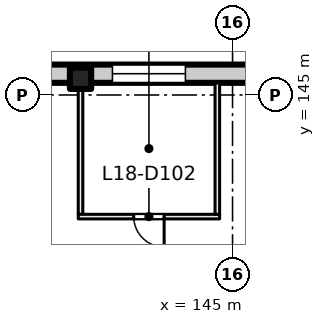
"""IFC4 building model, lengths in metres.
Left out: names, types, materials, properties, quantities, classifications, styles, units other than length and angle.
Written with IfcOpenShell. Run it as: python <this file> out.ifc"""

import sys

from ifc_helpers import new_model, si_unit, direction, frame, frame_2d, origin, origin_2d, place, context, subcontext, project, spatial, rectangle, extrude, element, fill, save


model = new_model("IFC4")
c1 = context("Model", 3, precision=1e-05, world=origin(), true_north=direction((0.0, 1.0)))
c2 = subcontext(c1, "Body", "Model", "MODEL_VIEW")
j1 = project(units=[si_unit("LENGTHUNIT", "METRE"), si_unit("PLANEANGLEUNIT", "RADIAN")], contexts=[c1])
p1 = place(None, origin())
s1 = spatial("IfcSite", under=j1, at=p1, CompositionType="ELEMENT")
p2 = place(p1, origin())
s2 = spatial("IfcBuilding", under=s1, at=p2, CompositionType="ELEMENT")
p3 = place(p2, frame((0.0, 0.0, 81.0)))
s3 = spatial("IfcBuildingStorey", under=s2, at=p3, CompositionType="ELEMENT", Elevation=81.0)
p4 = place(p3, frame((140.0, 145.55, 0.0), z_axis=(0.0, 0.0, 1.0), x_axis=(1.0, 0.0, 0.0)))
e1 = element("IfcColumn", 1, at=p4, inside=s3, PredefinedType="COLUMN", context=c2, shape_type="SweptSolid", body=[
    extrude(rectangle(XDim=0.7, YDim=0.7, at=origin_2d()), origin(), (0.0, 0.0, 1.0), 4.0),
])
p5 = place(p3, frame((131.07, 145.7, 0.0), z_axis=(0.0, 0.0, 1.0), x_axis=(1.0, 0.0, 0.0)))
e2 = element("IfcWall", 2, at=p5, inside=s3, PredefinedType="SOLIDWALL", context=c2, shape_type="SweptSolid", body=[
    extrude(rectangle(XDim=31.93, YDim=0.6, at=frame_2d((15.965, 0.0))), origin(), (0.0, 0.0, 1.0), 3.625),
])
p6 = place(p5, frame((0.98, 0.0, 0.9)))
e3 = element("IfcOpeningElement", 3, at=p6, cuts=e2, PredefinedType="OPENING", context=c2, shape_type="SweptSolid", body=[
    extrude(rectangle(XDim=2.4, YDim=2.4, at=frame_2d((1.2, 1.2))), frame((0.0, 0.31, 0.0), z_axis=(0.0, -1.0, 0.0), x_axis=(1.0, 0.0, 0.0)), (0.0, 0.0, 1.0), 0.62),
])
p7 = place(p5, frame((5.48, 0.0, 0.9)))
e4 = element("IfcOpeningElement", 4, at=p7, cuts=e2, PredefinedType="OPENING", context=c2, shape_type="SweptSolid", body=[
    extrude(rectangle(XDim=2.4, YDim=2.4, at=frame_2d((1.2, 1.2))), frame((0.0, 0.31, 0.0), z_axis=(0.0, -1.0, 0.0), x_axis=(1.0, 0.0, 0.0)), (0.0, 0.0, 1.0), 0.62),
])
p8 = place(p5, frame((9.98, 0.0, 0.9)))
e5 = element("IfcOpeningElement", 5, at=p8, cuts=e2, PredefinedType="OPENING", context=c2, shape_type="SweptSolid", body=[
    extrude(rectangle(XDim=2.4, YDim=2.4, at=frame_2d((1.2, 1.2))), frame((0.0, 0.31, 0.0), z_axis=(0.0, -1.0, 0.0), x_axis=(1.0, 0.0, 0.0)), (0.0, 0.0, 1.0), 0.62),
])
p9 = place(p5, frame((14.48, 0.0, 0.9)))
e6 = element("IfcOpeningElement", 6, at=p9, cuts=e2, PredefinedType="OPENING", context=c2, shape_type="SweptSolid", body=[
    extrude(rectangle(XDim=2.4, YDim=2.4, at=frame_2d((1.2, 1.2))), frame((0.0, 0.31, 0.0), z_axis=(0.0, -1.0, 0.0), x_axis=(1.0, 0.0, 0.0)), (0.0, 0.0, 1.0), 0.62),
])
p10 = place(p5, frame((18.98, 0.0, 0.9)))
e7 = element("IfcOpeningElement", 7, at=p10, cuts=e2, PredefinedType="OPENING", context=c2, shape_type="SweptSolid", body=[
    extrude(rectangle(XDim=2.4, YDim=2.4, at=frame_2d((1.2, 1.2))), frame((0.0, 0.31, 0.0), z_axis=(0.0, -1.0, 0.0), x_axis=(1.0, 0.0, 0.0)), (0.0, 0.0, 1.0), 0.62),
])
p11 = place(p5, frame((23.48, 0.0, 0.9)))
e8 = element("IfcOpeningElement", 8, at=p11, cuts=e2, PredefinedType="OPENING", context=c2, shape_type="SweptSolid", body=[
    extrude(rectangle(XDim=2.4, YDim=2.4, at=frame_2d((1.2, 1.2))), frame((0.0, 0.31, 0.0), z_axis=(0.0, -1.0, 0.0), x_axis=(1.0, 0.0, 0.0)), (0.0, 0.0, 1.0), 0.62),
])
p12 = place(p5, frame((27.98, 0.0, 0.9)))
e9 = element("IfcOpeningElement", 9, at=p12, cuts=e2, PredefinedType="OPENING", context=c2, shape_type="SweptSolid", body=[
    extrude(rectangle(XDim=2.4, YDim=2.4, at=frame_2d((1.2, 1.2))), frame((0.0, 0.31, 0.0), z_axis=(0.0, -1.0, 0.0), x_axis=(1.0, 0.0, 0.0)), (0.0, 0.0, 1.0), 0.62),
])
p13 = place(p3, frame((140.0, 141.075, 0.0), z_axis=(0.0, 0.0, 1.0), x_axis=(0.0, 1.0, 0.0)))
e10 = element("IfcWall", 10, at=p13, inside=s3, PredefinedType="PARTITIONING", context=c2, shape_type="SweptSolid", body=[
    extrude(rectangle(XDim=4.325, YDim=0.15, at=frame_2d((2.163, 0.0))), origin(), (0.0, 0.0, 1.0), 3.625),
])
p14 = place(p3, frame((144.575, 141.0, 0.0), z_axis=(0.0, 0.0, 1.0), x_axis=(-1.0, 0.0, 0.0)))
e11 = element("IfcWall", 11, at=p14, inside=s3, PredefinedType="PARTITIONING", context=c2, shape_type="SweptSolid", body=[
    extrude(rectangle(XDim=4.65, YDim=0.15, at=frame_2d((2.325, 0.0))), origin(), (0.0, 0.0, 1.0), 3.625),
])
p15 = place(p14, frame((1.825, 0.0, 0.0)))
e12 = element("IfcOpeningElement", 12, at=p15, cuts=e11, PredefinedType="OPENING", context=c2, shape_type="SweptSolid", body=[
    extrude(rectangle(XDim=1.0, YDim=2.1, at=frame_2d((0.5, 1.05))), frame((0.0, 0.085, 0.0), z_axis=(0.0, -1.0, 0.0), x_axis=(1.0, 0.0, 0.0)), (0.0, 0.0, 1.0), 0.17),
])
p16 = place(p3, frame((144.5, 145.4, 0.0), z_axis=(0.0, 0.0, 1.0), x_axis=(0.0, -1.0, 0.0)))
e13 = element("IfcWall", 13, at=p16, inside=s3, PredefinedType="PARTITIONING", context=c2, shape_type="SweptSolid", body=[
    extrude(rectangle(XDim=4.325, YDim=0.15, at=frame_2d((2.163, 0.0))), origin(), (0.0, 0.0, 1.0), 3.625),
])
p17 = place(p8, origin())
e14 = element("IfcWindow", 14, at=p17, inside=s3, PartitioningType="SINGLE_PANEL", PredefinedType="WINDOW", context=c2, shape_type="SweptSolid", body=[
    extrude(rectangle(XDim=2.4, YDim=2.4, at=frame_2d((1.2, 1.2))), frame((0.0, 0.03, 0.0), z_axis=(0.0, -1.0, 0.0), x_axis=(1.0, 0.0, 0.0)), (0.0, 0.0, 1.0), 0.06),
])
fill(e5, e14)
p18 = place(p15, origin())
e15 = element("IfcDoor", 15, at=p18, inside=s3, OperationType="SINGLE_SWING_LEFT", PredefinedType="DOOR", context=c2, shape_type="SweptSolid", body=[
    extrude(rectangle(XDim=1.0, YDim=2.1, at=frame_2d((0.5, 1.05))), frame((0.0, 0.025, 0.0), z_axis=(0.0, -1.0, 0.0), x_axis=(1.0, 0.0, 0.0)), (0.0, 0.0, 1.0), 0.05),
])
fill(e12, e15)
save(model, sys.argv[1])
